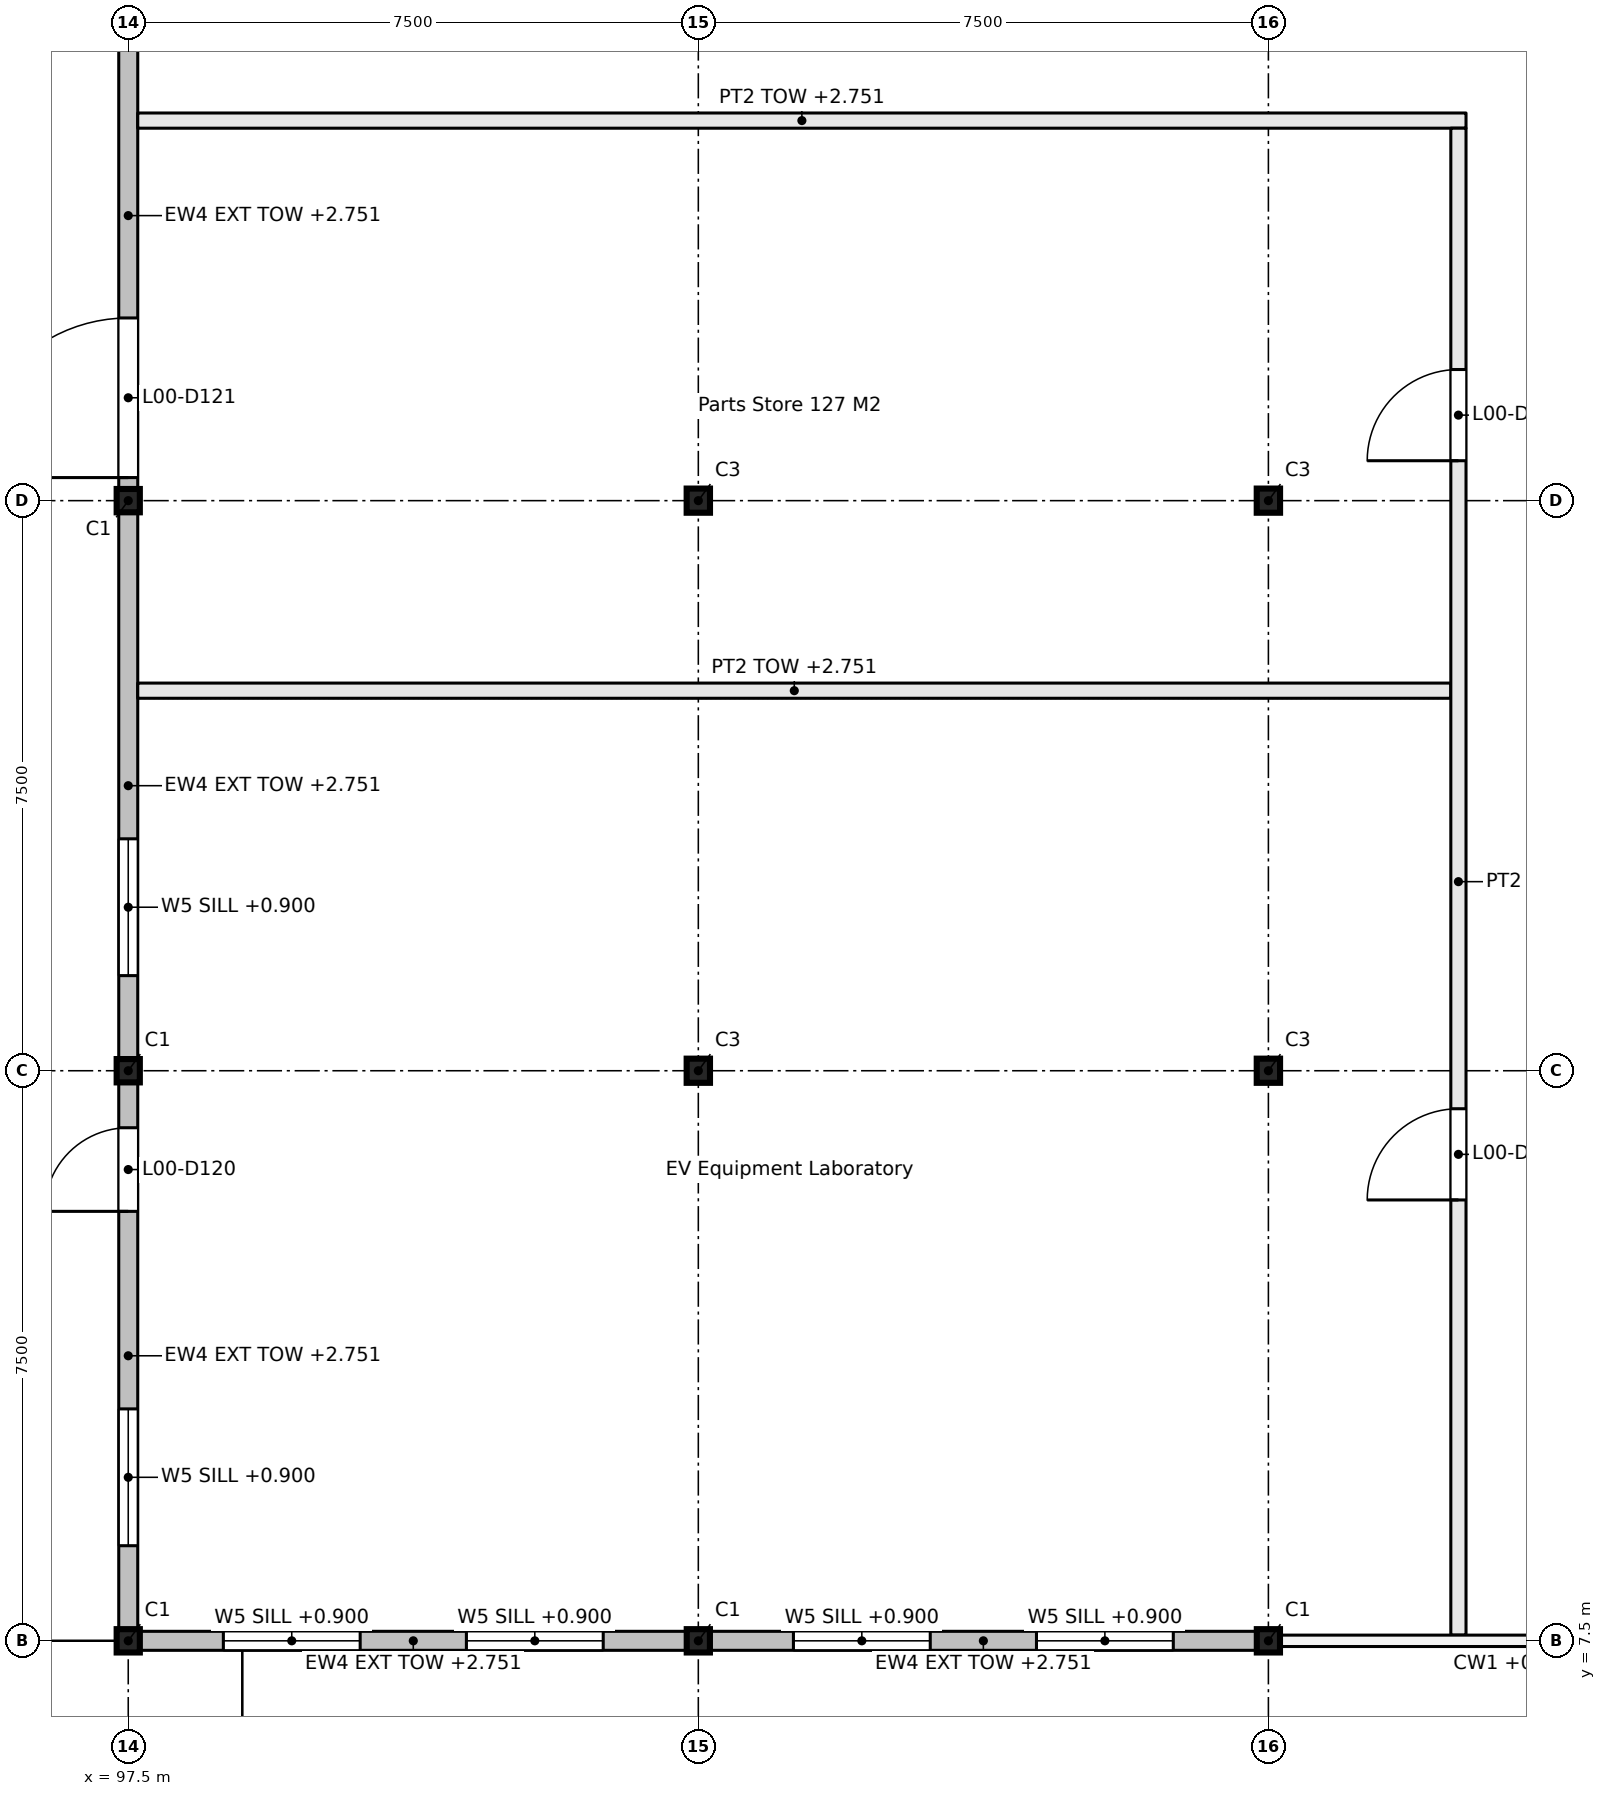
"""IFC4 building model, lengths in metres.
Left out: names, types, materials, properties, quantities, classifications, styles, units other than length and angle.
Written with IfcOpenShell. Run it as: python <this file> out.ifc"""

import sys

from ifc_helpers import new_model, si_unit, direction, frame, frame_2d, origin, origin_2d, place, context, subcontext, project, spatial, rectangle, i_section, extrude, element, fill, save


model = new_model("IFC4")
c1 = context("Model", 3, precision=1e-05, world=origin(), true_north=direction((0.0, 1.0)))
c2 = subcontext(c1, "Body", "Model", "MODEL_VIEW")
j1 = project(units=[si_unit("LENGTHUNIT", "METRE"), si_unit("PLANEANGLEUNIT", "RADIAN")], contexts=[c1])
p1 = place(None, origin())
s1 = spatial("IfcSite", under=j1, at=p1, CompositionType="ELEMENT")
p2 = place(p1, origin())
s2 = spatial("IfcBuilding", under=s1, at=p2, CompositionType="ELEMENT")
p3 = place(p2, origin())
s3 = spatial("IfcBuildingStorey", under=s2, at=p3, CompositionType="ELEMENT", Elevation=0.0)
for number, where, z_axis, x_axis in (
    (1, (97.5, 7.5, -0.25), (0.0, 0.0, 1.0), (1.0, 0.0, 0.0)),
    (2, (97.5, 15.0, -0.25), (0.0, 0.0, 1.0), (1.0, 0.0, 0.0)),
    (3, (97.5, 22.5, -0.25), (0.0, 0.0, 1.0), (1.0, 0.0, 0.0)),
    (4, (105.0, 7.5, -0.25), (0.0, 0.0, 1.0), (1.0, 0.0, 0.0)),
):
    element("IfcColumn", number, at=place(p3, frame(where, z_axis=z_axis, x_axis=x_axis)), inside=s3, PredefinedType="COLUMN", context=c2, shape_type="SweptSolid", body=[
        extrude(i_section(OverallWidth=0.305, OverallDepth=0.307, WebThickness=0.01, FlangeThickness=0.015, FilletRadius=0.015, at=origin_2d()), origin(), (0.0, 0.0, 1.0), 3.55),
    ])
for number, where, z_axis, x_axis in (
    (5, (105.0, 15.0, -0.25), (0.0, 0.0, 1.0), (1.0, 0.0, 0.0)),
    (6, (105.0, 22.5, -0.25), (0.0, 0.0, 1.0), (1.0, 0.0, 0.0)),
):
    element("IfcColumn", number, at=place(p3, frame(where, z_axis=z_axis, x_axis=x_axis)), inside=s3, PredefinedType="COLUMN", context=c2, shape_type="SweptSolid", body=[
        extrude(i_section(OverallWidth=0.307, OverallDepth=0.318, WebThickness=0.013, FlangeThickness=0.021, FilletRadius=0.015, at=origin_2d()), origin(), (0.0, 0.0, 1.0), 3.55),
    ])
p4 = place(p3, frame((112.5, 7.5, -0.25), z_axis=(0.0, 0.0, 1.0), x_axis=(1.0, 0.0, 0.0)))
e7 = element("IfcColumn", 7, at=p4, inside=s3, PredefinedType="COLUMN", context=c2, shape_type="SweptSolid", body=[
    extrude(i_section(OverallWidth=0.305, OverallDepth=0.307, WebThickness=0.01, FlangeThickness=0.015, FilletRadius=0.015, at=origin_2d()), origin(), (0.0, 0.0, 1.0), 3.55),
])
for number, where, z_axis, x_axis in (
    (8, (112.5, 15.0, -0.25), (0.0, 0.0, 1.0), (1.0, 0.0, 0.0)),
    (9, (112.5, 22.5, -0.25), (0.0, 0.0, 1.0), (1.0, 0.0, 0.0)),
):
    element("IfcColumn", number, at=place(p3, frame(where, z_axis=z_axis, x_axis=x_axis)), inside=s3, PredefinedType="COLUMN", context=c2, shape_type="SweptSolid", body=[
        extrude(i_section(OverallWidth=0.307, OverallDepth=0.318, WebThickness=0.013, FlangeThickness=0.021, FilletRadius=0.015, at=origin_2d()), origin(), (0.0, 0.0, 1.0), 3.55),
    ])
p5 = place(p3, frame((97.625, 20.0, 0.0), z_axis=(0.0, 0.0, 1.0), x_axis=(1.0, 0.0, 0.0)))
e10 = element("IfcWall", 10, at=p5, inside=s3, PredefinedType="PARTITIONING", context=c2, shape_type="SweptSolid", body=[
    extrude(rectangle(XDim=17.275, YDim=0.2, at=frame_2d((8.637, 0.0))), origin(), (0.0, 0.0, 1.0), 2.751),
])
p6 = place(p3, frame((97.625, 27.5, 0.0), z_axis=(0.0, 0.0, 1.0), x_axis=(1.0, 0.0, 0.0)))
e11 = element("IfcWall", 11, at=p6, inside=s3, PredefinedType="PARTITIONING", context=c2, shape_type="SweptSolid", body=[
    extrude(rectangle(XDim=17.475, YDim=0.2, at=frame_2d((8.738, 0.0))), origin(), (0.0, 0.0, 1.0), 2.751),
])
p7 = place(p3, frame((115.0, 7.575, 0.0), z_axis=(0.0, 0.0, 1.0), x_axis=(0.0, 1.0, 0.0)))
e12 = element("IfcWall", 12, at=p7, inside=s3, PredefinedType="PARTITIONING", context=c2, shape_type="SweptSolid", body=[
    extrude(rectangle(XDim=19.825, YDim=0.2, at=frame_2d((9.913, 0.0))), origin(), (0.0, 0.0, 1.0), 2.627),
])
p8 = place(p7, frame((5.725, 0.0, 0.0)))
e13 = element("IfcOpeningElement", 13, at=p8, cuts=e12, PredefinedType="OPENING", context=c2, shape_type="SweptSolid", body=[
    extrude(rectangle(XDim=1.2, YDim=2.1, at=frame_2d((0.6, 1.05))), frame((0.0, 0.11, 0.0), z_axis=(0.0, -1.0, 0.0), x_axis=(1.0, 0.0, 0.0)), (0.0, 0.0, 1.0), 0.22),
])
p9 = place(p7, frame((15.45, 0.0, 0.0)))
e14 = element("IfcOpeningElement", 14, at=p9, cuts=e12, PredefinedType="OPENING", context=c2, shape_type="SweptSolid", body=[
    extrude(rectangle(XDim=1.2, YDim=2.1, at=frame_2d((0.6, 1.05))), frame((0.0, 0.11, 0.0), z_axis=(0.0, -1.0, 0.0), x_axis=(1.0, 0.0, 0.0)), (0.0, 0.0, 1.0), 0.22),
])
p10 = place(p3, frame((97.654, 7.5, 0.0), z_axis=(0.0, 0.0, 1.0), x_axis=(1.0, 0.0, 0.0)))
e15 = element("IfcWall", 15, at=p10, inside=s3, PredefinedType="SOLIDWALL", context=c2, shape_type="SweptSolid", body=[
    extrude(rectangle(XDim=7.193, YDim=0.25, at=frame_2d((3.596, 0.0))), origin(), (0.0, 0.0, 1.0), 2.751),
])
p11 = place(p10, frame((1.098, 0.0, 0.9)))
e16 = element("IfcOpeningElement", 16, at=p11, cuts=e15, PredefinedType="OPENING", context=c2, shape_type="SweptSolid", body=[
    extrude(rectangle(XDim=1.8, YDim=1.5, at=frame_2d((0.9, 0.75))), frame((0.0, 0.135, 0.0), z_axis=(0.0, -1.0, 0.0), x_axis=(1.0, 0.0, 0.0)), (0.0, 0.0, 1.0), 0.27),
])
p12 = place(p10, frame((4.295, 0.0, 0.9)))
e17 = element("IfcOpeningElement", 17, at=p12, cuts=e15, PredefinedType="OPENING", context=c2, shape_type="SweptSolid", body=[
    extrude(rectangle(XDim=1.8, YDim=1.5, at=frame_2d((0.9, 0.75))), frame((0.0, 0.135, 0.0), z_axis=(0.0, -1.0, 0.0), x_axis=(1.0, 0.0, 0.0)), (0.0, 0.0, 1.0), 0.27),
])
p13 = place(p3, frame((105.154, 7.5, 0.0), z_axis=(0.0, 0.0, 1.0), x_axis=(1.0, 0.0, 0.0)))
e18 = element("IfcWall", 18, at=p13, inside=s3, PredefinedType="SOLIDWALL", context=c2, shape_type="SweptSolid", body=[
    extrude(rectangle(XDim=7.193, YDim=0.25, at=frame_2d((3.596, 0.0))), origin(), (0.0, 0.0, 1.0), 2.751),
])
p14 = place(p13, frame((1.098, 0.0, 0.9)))
e19 = element("IfcOpeningElement", 19, at=p14, cuts=e18, PredefinedType="OPENING", context=c2, shape_type="SweptSolid", body=[
    extrude(rectangle(XDim=1.8, YDim=1.5, at=frame_2d((0.9, 0.75))), frame((0.0, 0.135, 0.0), z_axis=(0.0, -1.0, 0.0), x_axis=(1.0, 0.0, 0.0)), (0.0, 0.0, 1.0), 0.27),
])
p15 = place(p13, frame((4.295, 0.0, 0.9)))
e20 = element("IfcOpeningElement", 20, at=p15, cuts=e18, PredefinedType="OPENING", context=c2, shape_type="SweptSolid", body=[
    extrude(rectangle(XDim=1.8, YDim=1.5, at=frame_2d((0.9, 0.75))), frame((0.0, 0.135, 0.0), z_axis=(0.0, -1.0, 0.0), x_axis=(1.0, 0.0, 0.0)), (0.0, 0.0, 1.0), 0.27),
])
p16 = place(p3, frame((97.5, 7.654, 0.0), z_axis=(0.0, 0.0, 1.0), x_axis=(0.0, 1.0, 0.0)))
e21 = element("IfcWall", 21, at=p16, inside=s3, PredefinedType="SOLIDWALL", context=c2, shape_type="SweptSolid", body=[
    extrude(rectangle(XDim=7.193, YDim=0.25, at=frame_2d((3.596, 0.0))), origin(), (0.0, 0.0, 1.0), 2.751),
])
p17 = place(p16, frame((5.497, 0.0, 0.0)))
e22 = element("IfcOpeningElement", 22, at=p17, cuts=e21, PredefinedType="OPENING", context=c2, shape_type="SweptSolid", body=[
    extrude(rectangle(XDim=1.1, YDim=2.4, at=frame_2d((0.55, 1.2))), frame((0.0, 0.135, 0.0), z_axis=(0.0, -1.0, 0.0), x_axis=(1.0, 0.0, 0.0)), (0.0, 0.0, 1.0), 0.27),
])
p18 = place(p16, frame((1.098, 0.0, 0.9)))
e23 = element("IfcOpeningElement", 23, at=p18, cuts=e21, PredefinedType="OPENING", context=c2, shape_type="SweptSolid", body=[
    extrude(rectangle(XDim=1.8, YDim=1.5, at=frame_2d((0.9, 0.75))), frame((0.0, 0.135, 0.0), z_axis=(0.0, -1.0, 0.0), x_axis=(1.0, 0.0, 0.0)), (0.0, 0.0, 1.0), 0.27),
])
p19 = place(p3, frame((97.5, 15.154, 0.0), z_axis=(0.0, 0.0, 1.0), x_axis=(0.0, 1.0, 0.0)))
e24 = element("IfcWall", 24, at=p19, inside=s3, PredefinedType="SOLIDWALL", context=c2, shape_type="SweptSolid", body=[
    extrude(rectangle(XDim=7.193, YDim=0.25, at=frame_2d((3.596, 0.0))), origin(), (0.0, 0.0, 1.0), 2.751),
])
p20 = place(p19, frame((1.098, 0.0, 0.9)))
e25 = element("IfcOpeningElement", 25, at=p20, cuts=e24, PredefinedType="OPENING", context=c2, shape_type="SweptSolid", body=[
    extrude(rectangle(XDim=1.8, YDim=1.5, at=frame_2d((0.9, 0.75))), frame((0.0, 0.135, 0.0), z_axis=(0.0, -1.0, 0.0), x_axis=(1.0, 0.0, 0.0)), (0.0, 0.0, 1.0), 0.27),
])
p21 = place(p3, frame((97.5, 22.654, 0.0), z_axis=(0.0, 0.0, 1.0), x_axis=(0.0, 1.0, 0.0)))
e26 = element("IfcWall", 26, at=p21, inside=s3, PredefinedType="SOLIDWALL", context=c2, shape_type="SweptSolid", body=[
    extrude(rectangle(XDim=7.193, YDim=0.25, at=frame_2d((3.596, 0.0))), origin(), (0.0, 0.0, 1.0), 2.751),
])
p22 = place(p21, frame((0.15, 0.0, 0.0)))
e27 = element("IfcOpeningElement", 27, at=p22, cuts=e26, PredefinedType="OPENING", context=c2, shape_type="SweptSolid", body=[
    extrude(rectangle(XDim=2.1, YDim=2.4, at=frame_2d((1.05, 1.2))), frame((0.0, 0.135, 0.0), z_axis=(0.0, -1.0, 0.0), x_axis=(1.0, 0.0, 0.0)), (0.0, 0.0, 1.0), 0.27),
])
p23 = place(p8, origin())
e28 = element("IfcDoor", 28, at=p23, inside=s3, OperationType="DOUBLE_DOOR_SINGLE_SWING", PredefinedType="DOOR", context=c2, shape_type="SweptSolid", body=[
    extrude(rectangle(XDim=1.2, YDim=2.1, at=frame_2d((0.6, 1.05))), frame((0.0, 0.025, 0.0), z_axis=(0.0, -1.0, 0.0), x_axis=(1.0, 0.0, 0.0)), (0.0, 0.0, 1.0), 0.05),
])
fill(e13, e28)
p24 = place(p9, origin())
e29 = element("IfcDoor", 29, at=p24, inside=s3, OperationType="DOUBLE_DOOR_SINGLE_SWING", PredefinedType="DOOR", context=c2, shape_type="SweptSolid", body=[
    extrude(rectangle(XDim=1.2, YDim=2.1, at=frame_2d((0.6, 1.05))), frame((0.0, 0.025, 0.0), z_axis=(0.0, -1.0, 0.0), x_axis=(1.0, 0.0, 0.0)), (0.0, 0.0, 1.0), 0.05),
])
fill(e14, e29)
p25 = place(p11, origin())
e30 = element("IfcWindow", 30, at=p25, inside=s3, PartitioningType="SINGLE_PANEL", PredefinedType="WINDOW", context=c2, shape_type="SweptSolid", body=[
    extrude(rectangle(XDim=1.8, YDim=1.5, at=frame_2d((0.9, 0.75))), frame((0.0, 0.03, 0.0), z_axis=(0.0, -1.0, 0.0), x_axis=(1.0, 0.0, 0.0)), (0.0, 0.0, 1.0), 0.06),
])
fill(e16, e30)
p26 = place(p12, origin())
e31 = element("IfcWindow", 31, at=p26, inside=s3, PartitioningType="SINGLE_PANEL", PredefinedType="WINDOW", context=c2, shape_type="SweptSolid", body=[
    extrude(rectangle(XDim=1.8, YDim=1.5, at=frame_2d((0.9, 0.75))), frame((0.0, 0.03, 0.0), z_axis=(0.0, -1.0, 0.0), x_axis=(1.0, 0.0, 0.0)), (0.0, 0.0, 1.0), 0.06),
])
fill(e17, e31)
p27 = place(p14, origin())
e32 = element("IfcWindow", 32, at=p27, inside=s3, PartitioningType="SINGLE_PANEL", PredefinedType="WINDOW", context=c2, shape_type="SweptSolid", body=[
    extrude(rectangle(XDim=1.8, YDim=1.5, at=frame_2d((0.9, 0.75))), frame((0.0, 0.03, 0.0), z_axis=(0.0, -1.0, 0.0), x_axis=(1.0, 0.0, 0.0)), (0.0, 0.0, 1.0), 0.06),
])
fill(e19, e32)
p28 = place(p15, origin())
e33 = element("IfcWindow", 33, at=p28, inside=s3, PartitioningType="SINGLE_PANEL", PredefinedType="WINDOW", context=c2, shape_type="SweptSolid", body=[
    extrude(rectangle(XDim=1.8, YDim=1.5, at=frame_2d((0.9, 0.75))), frame((0.0, 0.03, 0.0), z_axis=(0.0, -1.0, 0.0), x_axis=(1.0, 0.0, 0.0)), (0.0, 0.0, 1.0), 0.06),
])
fill(e20, e33)
p29 = place(p17, origin())
e34 = element("IfcDoor", 34, at=p29, inside=s3, OperationType="SINGLE_SWING_LEFT", PredefinedType="DOOR", context=c2, shape_type="SweptSolid", body=[
    extrude(rectangle(XDim=1.1, YDim=2.4, at=frame_2d((0.55, 1.2))), frame((0.0, 0.025, 0.0), z_axis=(0.0, -1.0, 0.0), x_axis=(1.0, 0.0, 0.0)), (0.0, 0.0, 1.0), 0.05),
])
fill(e22, e34)
p30 = place(p18, origin())
e35 = element("IfcWindow", 35, at=p30, inside=s3, PartitioningType="SINGLE_PANEL", PredefinedType="WINDOW", context=c2, shape_type="SweptSolid", body=[
    extrude(rectangle(XDim=1.8, YDim=1.5, at=frame_2d((0.9, 0.75))), frame((0.0, 0.03, 0.0), z_axis=(0.0, -1.0, 0.0), x_axis=(1.0, 0.0, 0.0)), (0.0, 0.0, 1.0), 0.06),
])
fill(e23, e35)
p31 = place(p20, origin())
e36 = element("IfcWindow", 36, at=p31, inside=s3, PartitioningType="SINGLE_PANEL", PredefinedType="WINDOW", context=c2, shape_type="SweptSolid", body=[
    extrude(rectangle(XDim=1.8, YDim=1.5, at=frame_2d((0.9, 0.75))), frame((0.0, 0.03, 0.0), z_axis=(0.0, -1.0, 0.0), x_axis=(1.0, 0.0, 0.0)), (0.0, 0.0, 1.0), 0.06),
])
fill(e25, e36)
p32 = place(p22, origin())
e37 = element("IfcDoor", 37, at=p32, inside=s3, OperationType="DOUBLE_DOOR_SINGLE_SWING", PredefinedType="DOOR", context=c2, shape_type="SweptSolid", body=[
    extrude(rectangle(XDim=2.1, YDim=2.4, at=frame_2d((1.05, 1.2))), frame((0.0, 0.025, 0.0), z_axis=(0.0, -1.0, 0.0), x_axis=(1.0, 0.0, 0.0)), (0.0, 0.0, 1.0), 0.05),
])
fill(e27, e37)
save(model, sys.argv[1])
